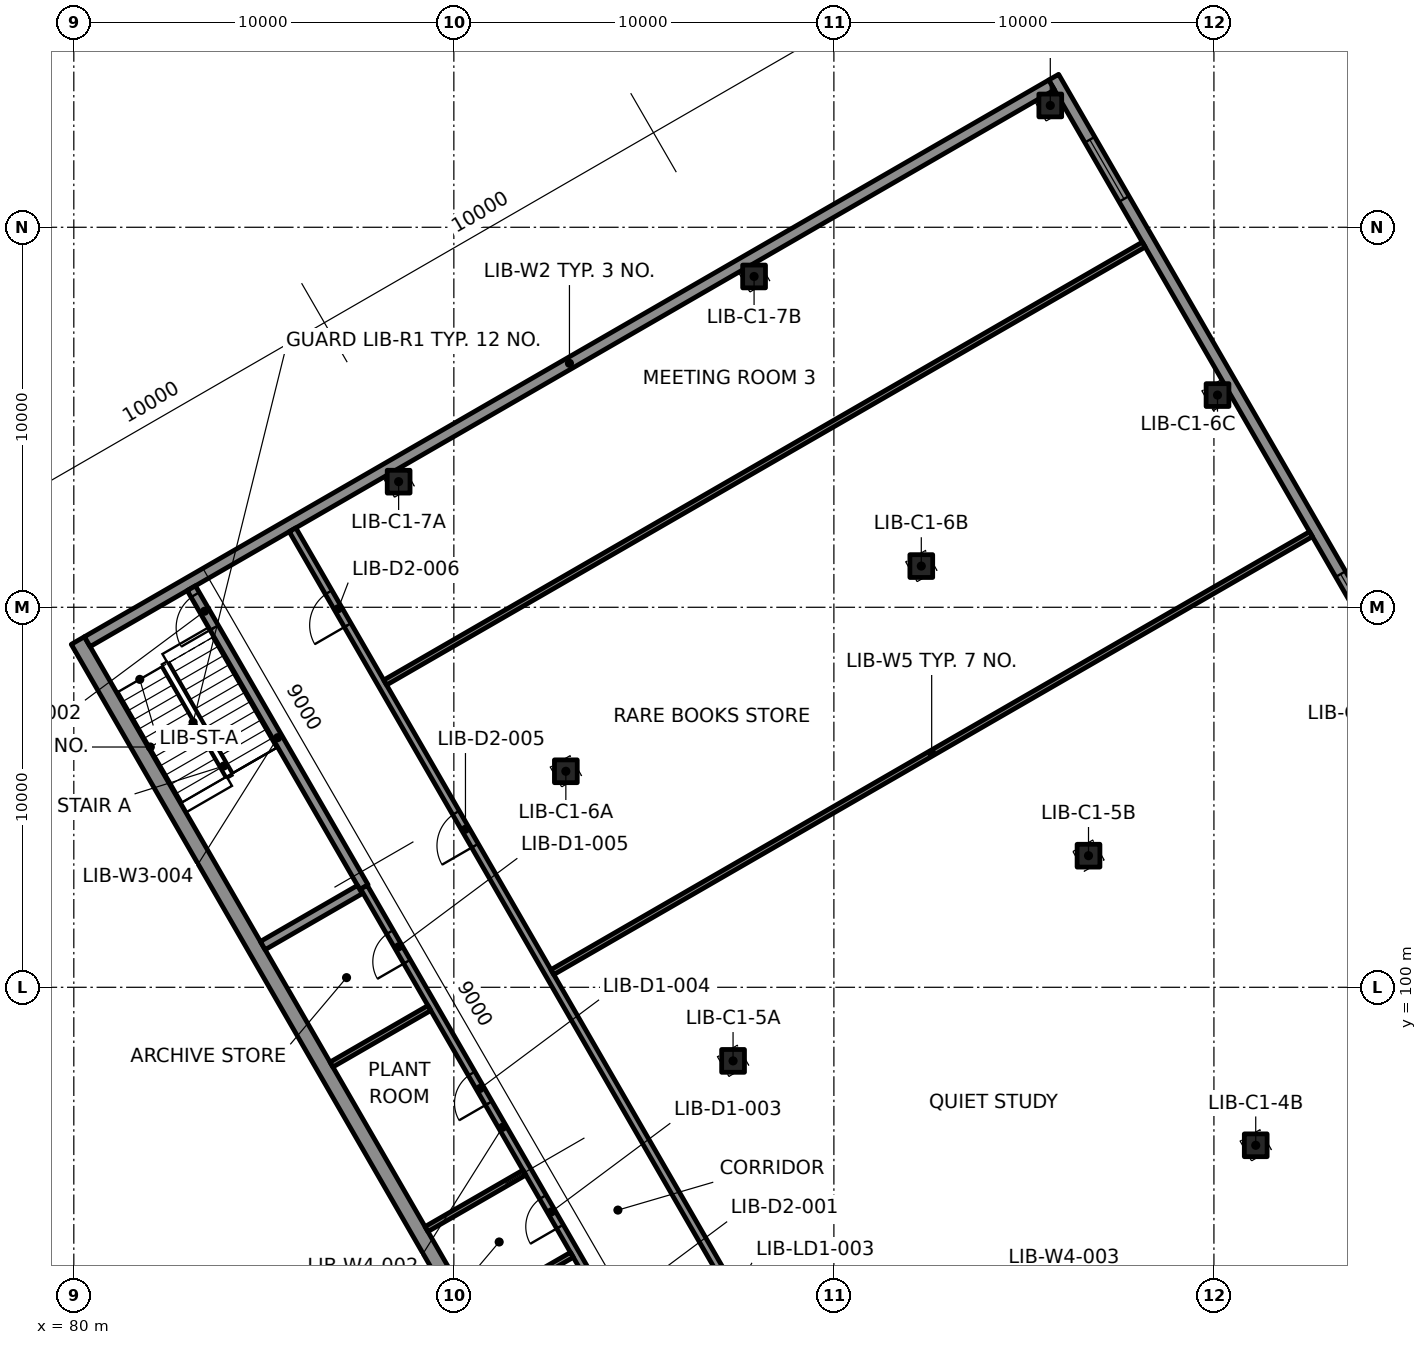
"""IFC4 building model, lengths in metres.
Left out: names, types, materials, properties, quantities, classifications, styles, units other than length and angle.
Written with IfcOpenShell. Run it as: python <this file> out.ifc"""

import sys

from ifc_helpers import new_model, si_unit, direction, frame, frame_2d, origin, origin_2d, place, context, subcontext, project, spatial, rectangle, extrude, element, fill, save


model = new_model("IFC4")
c1 = context("Model", 3, precision=1e-05, world=origin(), true_north=direction((0.0, 1.0)))
c2 = subcontext(c1, "Body", "Model", "MODEL_VIEW")
j1 = project(units=[si_unit("LENGTHUNIT", "METRE"), si_unit("PLANEANGLEUNIT", "RADIAN")], contexts=[c1])
p1 = place(None, origin())
s1 = spatial("IfcSite", under=j1, at=p1, CompositionType="ELEMENT")
p2 = place(p1, origin())
s2 = spatial("IfcBuilding", under=s1, at=p2, CompositionType="ELEMENT")
p3 = place(p2, frame((0.0, 0.0, 17.2)))
s3 = spatial("IfcBuildingStorey", under=s2, at=p3, CompositionType="ELEMENT", Elevation=17.2)
for number, where, z_axis, x_axis in (
    (1, (87.421, 93.256, -0.0), (0.0, 0.0, 1.0), (-0.5, 0.866, 0.0)),
    (2, (82.621, 101.57, -0.0), (0.0, 0.0, 1.0), (-0.5, 0.866, 0.0)),
):
    element("IfcColumn", number, at=place(p3, frame(where, z_axis=z_axis, x_axis=x_axis)), inside=s3, PredefinedType="COLUMN", context=c2, shape_type="SweptSolid", body=[
        extrude(rectangle(XDim=1.2, YDim=1.5, at=origin_2d()), origin(), (0.0, 0.0, 1.0), 4.6),
    ])
p4 = place(p3, frame((75.975, 98.1, 0.0), z_axis=(0.0, 0.0, 1.0), x_axis=(1.0, 0.0, 0.0)))
e3 = element("IfcWall", 3, at=p4, inside=s3, PredefinedType="PARTITIONING", context=c2, shape_type="SweptSolid", body=[
    extrude(rectangle(XDim=5.649, YDim=0.15, at=frame_2d((2.825, 0.0))), origin(), (0.0, 0.0, 1.0), 3.7),
])
p5 = place(p3, frame((81.7, 87.5, 0.0), z_axis=(0.0, 0.0, 1.0), x_axis=(0.0, 1.0, 0.0)))
e4 = element("IfcWall", 4, at=p5, inside=s3, PredefinedType="PARTITIONING", context=c2, shape_type="SweptSolid", body=[
    extrude(rectangle(XDim=10.599, YDim=0.15, at=frame_2d((5.3, 0.0))), origin(), (0.0, 0.0, 1.0), 3.7),
])
for number, where, z_axis, x_axis in (
    (5, (111.1, 95.842, -0.36), (0.0, 0.0, 1.0), (1.0, 0.0, 0.0)),
    (6, (97.347, 98.063, -0.36), (0.0, 0.0, 1.0), (1.0, 0.0, 0.0)),
    (7, (106.7, 103.463, -0.36), (0.0, 0.0, 1.0), (1.0, 0.0, 0.0)),
    (8, (92.947, 105.684, -0.36), (0.0, 0.0, 1.0), (1.0, 0.0, 0.0)),
    (9, (102.3, 111.084, -0.36), (0.0, 0.0, 1.0), (1.0, 0.0, 0.0)),
    (10, (110.094, 115.584, -0.36), (0.0, 0.0, 1.0), (1.0, 0.0, 0.0)),
    (11, (88.547, 113.305, -0.36), (0.0, 0.0, 1.0), (1.0, 0.0, 0.0)),
    (12, (97.9, 118.705, -0.36), (0.0, 0.0, 1.0), (1.0, 0.0, 0.0)),
    (13, (105.694, 123.205, -0.36), (0.0, 0.0, 1.0), (1.0, 0.0, 0.0)),
):
    element("IfcColumn", number, at=place(p3, frame(where, z_axis=z_axis, x_axis=x_axis)), inside=s3, PredefinedType="COLUMN", context=c2, shape_type="SweptSolid", body=[
        extrude(rectangle(XDim=0.6, YDim=0.6, at=origin_2d()), origin(), (0.0, 0.0, 1.0), 4.6),
    ])
p6 = place(p3, frame((107.106, 62.36, 0.0), z_axis=(0.0, 0.0, 1.0), x_axis=(-0.49999992739, 0.866025445706, 0.0)))
e14 = element("IfcWall", 14, at=p6, inside=s3, PredefinedType="SOLIDWALL", context=c2, shape_type="SweptSolid", body=[
    extrude(rectangle(XDim=54.0, YDim=0.4, at=frame_2d((27.0, 0.0))), origin(), (0.0, 0.0, 1.0), 4.24),
])
p7 = place(p3, frame((132.784, 77.185, 0.0), z_axis=(0.0, 0.0, 1.0), x_axis=(-0.49999992739, 0.866025445706, 0.0)))
e15 = element("IfcWall", 15, at=p7, inside=s3, PredefinedType="SOLIDWALL", context=c2, shape_type="SweptSolid", body=[
    extrude(rectangle(XDim=54.0, YDim=0.3, at=frame_2d((27.0, 0.0))), origin(), (0.0, 0.0, 1.0), 4.24),
])
p8 = place(p7, frame((1.9, 0.0, 0.9)))
e16 = element("IfcOpeningElement", 16, at=p8, cuts=e15, PredefinedType="OPENING", context=c2, shape_type="SweptSolid", body=[
    extrude(rectangle(XDim=1.8, YDim=2.4, at=frame_2d((0.9, 1.2))), frame((0.0, 0.16, 0.0), z_axis=(0.0, -1.0, 0.0), x_axis=(1.0, 0.0, 0.0)), (0.0, 0.0, 1.0), 0.32),
])
p9 = place(p7, frame((6.3, 0.0, 0.9)))
e17 = element("IfcOpeningElement", 17, at=p9, cuts=e15, PredefinedType="OPENING", context=c2, shape_type="SweptSolid", body=[
    extrude(rectangle(XDim=1.8, YDim=2.4, at=frame_2d((0.9, 1.2))), frame((0.0, 0.16, 0.0), z_axis=(0.0, -1.0, 0.0), x_axis=(1.0, 0.0, 0.0)), (0.0, 0.0, 1.0), 0.32),
])
p10 = place(p7, frame((10.7, 0.0, 0.9)))
e18 = element("IfcOpeningElement", 18, at=p10, cuts=e15, PredefinedType="OPENING", context=c2, shape_type="SweptSolid", body=[
    extrude(rectangle(XDim=1.8, YDim=2.4, at=frame_2d((0.9, 1.2))), frame((0.0, 0.16, 0.0), z_axis=(0.0, -1.0, 0.0), x_axis=(1.0, 0.0, 0.0)), (0.0, 0.0, 1.0), 0.32),
])
p11 = place(p7, frame((15.1, 0.0, 0.9)))
e19 = element("IfcOpeningElement", 19, at=p11, cuts=e15, PredefinedType="OPENING", context=c2, shape_type="SweptSolid", body=[
    extrude(rectangle(XDim=1.8, YDim=2.4, at=frame_2d((0.9, 1.2))), frame((0.0, 0.16, 0.0), z_axis=(0.0, -1.0, 0.0), x_axis=(1.0, 0.0, 0.0)), (0.0, 0.0, 1.0), 0.32),
])
p12 = place(p7, frame((19.5, 0.0, 0.9)))
e20 = element("IfcOpeningElement", 20, at=p12, cuts=e15, PredefinedType="OPENING", context=c2, shape_type="SweptSolid", body=[
    extrude(rectangle(XDim=1.8, YDim=2.4, at=frame_2d((0.9, 1.2))), frame((0.0, 0.16, 0.0), z_axis=(0.0, -1.0, 0.0), x_axis=(1.0, 0.0, 0.0)), (0.0, 0.0, 1.0), 0.32),
])
p13 = place(p7, frame((23.9, 0.0, 0.9)))
e21 = element("IfcOpeningElement", 21, at=p13, cuts=e15, PredefinedType="OPENING", context=c2, shape_type="SweptSolid", body=[
    extrude(rectangle(XDim=1.8, YDim=2.4, at=frame_2d((0.9, 1.2))), frame((0.0, 0.16, 0.0), z_axis=(0.0, -1.0, 0.0), x_axis=(1.0, 0.0, 0.0)), (0.0, 0.0, 1.0), 0.32),
])
p14 = place(p7, frame((28.3, 0.0, 0.9)))
e22 = element("IfcOpeningElement", 22, at=p14, cuts=e15, PredefinedType="OPENING", context=c2, shape_type="SweptSolid", body=[
    extrude(rectangle(XDim=1.8, YDim=2.4, at=frame_2d((0.9, 1.2))), frame((0.0, 0.16, 0.0), z_axis=(0.0, -1.0, 0.0), x_axis=(1.0, 0.0, 0.0)), (0.0, 0.0, 1.0), 0.32),
])
p15 = place(p7, frame((32.7, 0.0, 0.9)))
e23 = element("IfcOpeningElement", 23, at=p15, cuts=e15, PredefinedType="OPENING", context=c2, shape_type="SweptSolid", body=[
    extrude(rectangle(XDim=1.8, YDim=2.4, at=frame_2d((0.9, 1.2))), frame((0.0, 0.16, 0.0), z_axis=(0.0, -1.0, 0.0), x_axis=(1.0, 0.0, 0.0)), (0.0, 0.0, 1.0), 0.32),
])
p16 = place(p7, frame((37.1, 0.0, 0.9)))
e24 = element("IfcOpeningElement", 24, at=p16, cuts=e15, PredefinedType="OPENING", context=c2, shape_type="SweptSolid", body=[
    extrude(rectangle(XDim=1.8, YDim=2.4, at=frame_2d((0.9, 1.2))), frame((0.0, 0.16, 0.0), z_axis=(0.0, -1.0, 0.0), x_axis=(1.0, 0.0, 0.0)), (0.0, 0.0, 1.0), 0.32),
])
p17 = place(p7, frame((50.3, 0.0, 0.9)))
e25 = element("IfcOpeningElement", 25, at=p17, cuts=e15, PredefinedType="OPENING", context=c2, shape_type="SweptSolid", body=[
    extrude(rectangle(XDim=1.8, YDim=2.4, at=frame_2d((0.9, 1.2))), frame((0.0, 0.16, 0.0), z_axis=(0.0, -1.0, 0.0), x_axis=(1.0, 0.0, 0.0)), (0.0, 0.0, 1.0), 0.32),
])
p18 = place(p3, frame((80.354, 109.095, 0.0), z_axis=(0.0, 0.0, 1.0), x_axis=(0.866026568746, 0.499997982221, 0.0)))
e26 = element("IfcWall", 26, at=p18, inside=s3, PredefinedType="SOLIDWALL", context=c2, shape_type="SweptSolid", body=[
    extrude(rectangle(XDim=29.3, YDim=0.3, at=frame_2d((14.65, 0.0))), origin(), (0.0, 0.0, 1.0), 4.24),
])
p19 = place(p3, frame((87.635, 102.635, 0.0), z_axis=(0.0, 0.0, 1.0), x_axis=(-0.499994616197, 0.866028512102, 0.0)))
e27 = element("IfcWall", 27, at=p19, inside=s3, PredefinedType="SOLIDWALL", context=c2, shape_type="SweptSolid", body=[
    extrude(rectangle(XDim=9.085, YDim=0.25, at=frame_2d((4.542, 0.0))), origin(), (0.0, 0.0, 1.0), 4.24),
])
p20 = place(p19, frame((7.885, 0.0, 0.0)))
e28 = element("IfcOpeningElement", 28, at=p20, cuts=e27, PredefinedType="OPENING", context=c2, shape_type="SweptSolid", body=[
    extrude(rectangle(XDim=1.0, YDim=2.1, at=frame_2d((0.5, 1.05))), frame((0.0, 0.135, 0.0), z_axis=(0.0, -1.0, 0.0), x_axis=(1.0, 0.0, 0.0)), (0.0, 0.0, 1.0), 0.27),
])
p21 = place(p3, frame((94.93, 90.0, 0.0), z_axis=(0.0, 0.0, 1.0), x_axis=(-0.499997667785, 0.866026750285, 0.0)))
e29 = element("IfcWall", 29, at=p21, inside=s3, PredefinedType="PARTITIONING", context=c2, shape_type="SweptSolid", body=[
    extrude(rectangle(XDim=14.59, YDim=0.2, at=frame_2d((7.295, 0.0))), origin(), (0.0, 0.0, 1.0), 4.24),
])
p22 = place(p21, frame((1.235, 0.0, 0.0)))
e30 = element("IfcOpeningElement", 30, at=p22, cuts=e29, PredefinedType="OPENING", context=c2, shape_type="SweptSolid", body=[
    extrude(rectangle(XDim=1.0, YDim=2.1, at=frame_2d((0.5, 1.05))), frame((0.0, 0.11, 0.0), z_axis=(0.0, -1.0, 0.0), x_axis=(1.0, 0.0, 0.0)), (0.0, 0.0, 1.0), 0.22),
])
p23 = place(p21, frame((4.275, 0.0, 0.0)))
e31 = element("IfcOpeningElement", 31, at=p23, cuts=e29, PredefinedType="OPENING", context=c2, shape_type="SweptSolid", body=[
    extrude(rectangle(XDim=0.9, YDim=2.1, at=frame_2d((0.45, 1.05))), frame((0.0, 0.11, 0.0), z_axis=(0.0, -1.0, 0.0), x_axis=(1.0, 0.0, 0.0)), (0.0, 0.0, 1.0), 0.22),
])
p24 = place(p21, frame((8.025, 0.0, 0.0)))
e32 = element("IfcOpeningElement", 32, at=p24, cuts=e29, PredefinedType="OPENING", context=c2, shape_type="SweptSolid", body=[
    extrude(rectangle(XDim=0.9, YDim=2.1, at=frame_2d((0.45, 1.05))), frame((0.0, 0.11, 0.0), z_axis=(0.0, -1.0, 0.0), x_axis=(1.0, 0.0, 0.0)), (0.0, 0.0, 1.0), 0.22),
])
p25 = place(p21, frame((12.325, 0.0, 0.0)))
e33 = element("IfcOpeningElement", 33, at=p25, cuts=e29, PredefinedType="OPENING", context=c2, shape_type="SweptSolid", body=[
    extrude(rectangle(XDim=0.9, YDim=2.1, at=frame_2d((0.45, 1.05))), frame((0.0, 0.11, 0.0), z_axis=(0.0, -1.0, 0.0), x_axis=(1.0, 0.0, 0.0)), (0.0, 0.0, 1.0), 0.22),
])
for number, where, z_axis, x_axis in (
    (34, (90.529, 91.471, 0.0), (0.0, 0.0, 1.0), (0.866, 0.5, 0.0)),
    (35, (89.279, 93.636, 0.0), (0.0, 0.0, 1.0), (0.866, 0.5, 0.0)),
):
    element("IfcWall", number, at=place(p3, frame(where, z_axis=z_axis, x_axis=x_axis)), inside=s3, PredefinedType="PARTITIONING", context=c2, shape_type="SweptSolid", body=[
        extrude(rectangle(XDim=2.975, YDim=0.15, at=frame_2d((1.488, 0.0))), origin(), (0.0, 0.0, 1.0), 4.24),
    ])
p26 = place(p3, frame((86.779, 97.967, 0.0), z_axis=(0.0, 0.0, 1.0), x_axis=(0.866053027861, 0.499952150643, 0.0)))
e36 = element("IfcWall", 36, at=p26, inside=s3, PredefinedType="PARTITIONING", context=c2, shape_type="SweptSolid", body=[
    extrude(rectangle(XDim=2.975, YDim=0.15, at=frame_2d((1.487, 0.0))), origin(), (0.0, 0.0, 1.0), 4.24),
])
p27 = place(p3, frame((84.972, 101.097, 0.0), z_axis=(0.0, 0.0, 1.0), x_axis=(0.866039495442, 0.49997559174, 0.0)))
e37 = element("IfcWall", 37, at=p27, inside=s3, PredefinedType="SOLIDWALL", context=c2, shape_type="SweptSolid", body=[
    extrude(rectangle(XDim=2.95, YDim=0.25, at=frame_2d((1.475, 0.0))), origin(), (0.0, 0.0, 1.0), 4.24),
])
p28 = place(p3, frame((112.496, 65.725, 0.0), z_axis=(0.0, 0.0, 1.0), x_axis=(-0.499998673217, 0.866026169802, 0.0)))
e38 = element("IfcWall", 38, at=p28, inside=s3, PredefinedType="PARTITIONING", context=c2, shape_type="SweptSolid", body=[
    extrude(rectangle(XDim=53.48, YDim=0.2, at=frame_2d((26.74, 0.0))), origin(), (0.0, 0.0, 1.0), 4.24),
])
p29 = place(p28, frame((13.08, 0.0, 0.0)))
e39 = element("IfcOpeningElement", 39, at=p29, cuts=e38, PredefinedType="OPENING", context=c2, shape_type="SweptSolid", body=[
    extrude(rectangle(XDim=1.0, YDim=2.1, at=frame_2d((0.5, 1.05))), frame((0.0, 0.11, 0.0), z_axis=(0.0, -1.0, 0.0), x_axis=(1.0, 0.0, 0.0)), (0.0, 0.0, 1.0), 0.22),
])
p30 = place(p28, frame((26.28, 0.0, 0.0)))
e40 = element("IfcOpeningElement", 40, at=p30, cuts=e38, PredefinedType="OPENING", context=c2, shape_type="SweptSolid", body=[
    extrude(rectangle(XDim=1.0, YDim=2.1, at=frame_2d((0.5, 1.05))), frame((0.0, 0.11, 0.0), z_axis=(0.0, -1.0, 0.0), x_axis=(1.0, 0.0, 0.0)), (0.0, 0.0, 1.0), 0.22),
])
p31 = place(p28, frame((43.88, 0.0, 0.0)))
e41 = element("IfcOpeningElement", 41, at=p31, cuts=e38, PredefinedType="OPENING", context=c2, shape_type="SweptSolid", body=[
    extrude(rectangle(XDim=1.0, YDim=2.1, at=frame_2d((0.5, 1.05))), frame((0.0, 0.11, 0.0), z_axis=(0.0, -1.0, 0.0), x_axis=(1.0, 0.0, 0.0)), (0.0, 0.0, 1.0), 0.22),
])
p32 = place(p28, frame((50.58, 0.0, 0.0)))
e42 = element("IfcOpeningElement", 42, at=p32, cuts=e38, PredefinedType="OPENING", context=c2, shape_type="SweptSolid", body=[
    extrude(rectangle(XDim=1.0, YDim=2.1, at=frame_2d((0.5, 1.05))), frame((0.0, 0.11, 0.0), z_axis=(0.0, -1.0, 0.0), x_axis=(1.0, 0.0, 0.0)), (0.0, 0.0, 1.0), 0.22),
])
for number, where, z_axis, x_axis in (
    (43, (101.392, 85.157, 0.0), (0.0, 0.0, 1.0), (0.866, 0.5, 0.0)),
    (44, (92.592, 100.399, 0.0), (0.0, 0.0, 1.0), (0.866, 0.5, 0.0)),
    (45, (88.192, 108.02, 0.0), (0.0, 0.0, 1.0), (0.866, 0.5, 0.0)),
):
    element("IfcWall", number, at=place(p3, frame(where, z_axis=z_axis, x_axis=x_axis)), inside=s3, PredefinedType="PARTITIONING", context=c2, shape_type="SweptSolid", body=[
        extrude(rectangle(XDim=23.05, YDim=0.15, at=frame_2d((11.525, 0.0))), origin(), (0.0, 0.0, 1.0), 4.24),
    ])
p33 = place(p16, origin())
e46 = element("IfcWindow", 46, at=p33, inside=s3, PartitioningType="SINGLE_PANEL", PredefinedType="WINDOW", context=c2, shape_type="SweptSolid", body=[
    extrude(rectangle(XDim=1.8, YDim=2.4, at=frame_2d((0.9, 1.2))), frame((0.0, 0.03, 0.0), z_axis=(0.0, -1.0, 0.0), x_axis=(1.0, 0.0, 0.0)), (0.0, 0.0, 1.0), 0.06),
])
fill(e24, e46)
p34 = place(p17, origin())
e47 = element("IfcWindow", 47, at=p34, inside=s3, PartitioningType="SINGLE_PANEL", PredefinedType="WINDOW", context=c2, shape_type="SweptSolid", body=[
    extrude(rectangle(XDim=1.8, YDim=2.4, at=frame_2d((0.9, 1.2))), frame((0.0, 0.03, 0.0), z_axis=(0.0, -1.0, 0.0), x_axis=(1.0, 0.0, 0.0)), (0.0, 0.0, 1.0), 0.06),
])
fill(e25, e47)
p35 = place(p20, origin())
e48 = element("IfcDoor", 48, at=p35, inside=s3, OperationType="SINGLE_SWING_RIGHT", PredefinedType="DOOR", context=c2, shape_type="SweptSolid", body=[
    extrude(rectangle(XDim=1.0, YDim=2.1, at=frame_2d((0.5, 1.05))), frame((0.0, 0.025, 0.0), z_axis=(0.0, -1.0, 0.0), x_axis=(1.0, 0.0, 0.0)), (0.0, 0.0, 1.0), 0.05),
])
fill(e28, e48)
p36 = place(p23, origin())
e49 = element("IfcDoor", 49, at=p36, inside=s3, OperationType="SINGLE_SWING_RIGHT", PredefinedType="DOOR", context=c2, shape_type="SweptSolid", body=[
    extrude(rectangle(XDim=0.9, YDim=2.1, at=frame_2d((0.45, 1.05))), frame((0.0, 0.025, 0.0), z_axis=(0.0, -1.0, 0.0), x_axis=(1.0, 0.0, 0.0)), (0.0, 0.0, 1.0), 0.05),
])
fill(e31, e49)
p37 = place(p24, origin())
e50 = element("IfcDoor", 50, at=p37, inside=s3, OperationType="SINGLE_SWING_RIGHT", PredefinedType="DOOR", context=c2, shape_type="SweptSolid", body=[
    extrude(rectangle(XDim=0.9, YDim=2.1, at=frame_2d((0.45, 1.05))), frame((0.0, 0.025, 0.0), z_axis=(0.0, -1.0, 0.0), x_axis=(1.0, 0.0, 0.0)), (0.0, 0.0, 1.0), 0.05),
])
fill(e32, e50)
p38 = place(p25, origin())
e51 = element("IfcDoor", 51, at=p38, inside=s3, OperationType="SINGLE_SWING_LEFT", PredefinedType="DOOR", context=c2, shape_type="SweptSolid", body=[
    extrude(rectangle(XDim=0.9, YDim=2.1, at=frame_2d((0.45, 1.05))), frame((0.0, 0.025, 0.0), z_axis=(0.0, -1.0, 0.0), x_axis=(1.0, 0.0, 0.0)), (0.0, 0.0, 1.0), 0.05),
])
fill(e33, e51)
p39 = place(p31, origin())
e52 = element("IfcDoor", 52, at=p39, inside=s3, OperationType="SINGLE_SWING_LEFT", PredefinedType="DOOR", context=c2, shape_type="SweptSolid", body=[
    extrude(rectangle(XDim=1.0, YDim=2.1, at=frame_2d((0.5, 1.05))), frame((0.0, 0.025, 0.0), z_axis=(0.0, -1.0, 0.0), x_axis=(1.0, 0.0, 0.0)), (0.0, 0.0, 1.0), 0.05),
])
fill(e41, e52)
p40 = place(p32, origin())
e53 = element("IfcDoor", 53, at=p40, inside=s3, OperationType="SINGLE_SWING_RIGHT", PredefinedType="DOOR", context=c2, shape_type="SweptSolid", body=[
    extrude(rectangle(XDim=1.0, YDim=2.1, at=frame_2d((0.5, 1.05))), frame((0.0, 0.025, 0.0), z_axis=(0.0, -1.0, 0.0), x_axis=(1.0, 0.0, 0.0)), (0.0, 0.0, 1.0), 0.05),
])
fill(e42, e53)
save(model, sys.argv[1])
